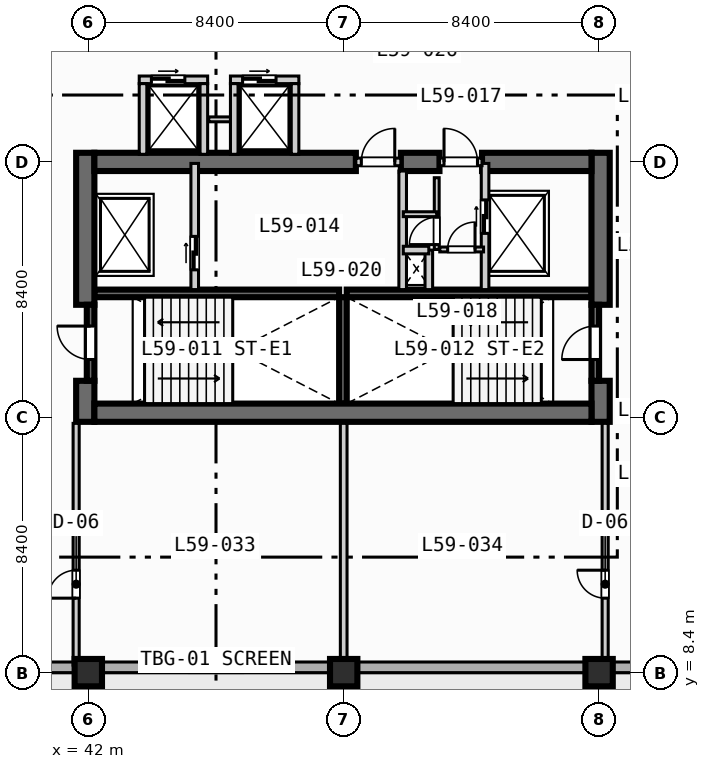
"""IFC4 building model, lengths in metres.
Left out: names, types, materials, properties, quantities, classifications, styles, units other than length and angle.
Written with IfcOpenShell. Run it as: python <this file> out.ifc"""

import sys

from ifc_helpers import new_model, si_unit, direction, frame, frame_2d, origin, origin_2d, place, context, subcontext, project, spatial, rectangle, extrude, element, fill, save


model = new_model("IFC4")
c1 = context("Model", 3, precision=1e-05, world=origin(), true_north=direction((0.0, 1.0)))
c2 = subcontext(c1, "Body", "Model", "MODEL_VIEW")
j1 = project(units=[si_unit("LENGTHUNIT", "METRE"), si_unit("PLANEANGLEUNIT", "RADIAN")], contexts=[c1])
p1 = place(None, origin())
s1 = spatial("IfcSite", under=j1, at=p1, CompositionType="ELEMENT")
p2 = place(p1, origin())
s2 = spatial("IfcBuilding", under=s1, at=p2, CompositionType="ELEMENT")
p3 = place(p2, frame((0.0, 0.0, 241.6)))
s3 = spatial("IfcBuildingStorey", under=s2, at=p3, CompositionType="ELEMENT", Elevation=241.6)
for number, where, z_axis, x_axis in (
    (1, (42.2, 20.875, 0.0), (0.0, 0.0, 1.0), (1.0, 0.0, 0.0)),
    (2, (50.5, 20.875, 0.0), (0.0, 0.0, 1.0), (1.0, 0.0, 0.0)),
):
    element("IfcWall", number, at=place(p3, frame(where, z_axis=z_axis, x_axis=x_axis)), inside=s3, PredefinedType="SOLIDWALL", context=c2, shape_type="SweptSolid", body=[
        extrude(rectangle(XDim=8.05, YDim=0.25, at=frame_2d((4.025, 0.0))), origin(), (0.0, 0.0, 1.0), 3.47),
    ])
p4 = place(p3, frame((50.375, 17.25, 0.0), z_axis=(0.0, 0.0, 1.0), x_axis=(0.0, 1.0, 0.0)))
e3 = element("IfcWall", 3, at=p4, inside=s3, PredefinedType="SOLIDWALL", context=c2, shape_type="SweptSolid", body=[
    extrude(rectangle(XDim=3.5, YDim=0.25, at=frame_2d((1.75, 0.0))), origin(), (0.0, 0.0, 1.0), 3.47),
])
p5 = place(p3, frame((41.9, 16.65, 0.0), z_axis=(0.0, 0.0, 1.0), x_axis=(0.0, 1.0, 0.0)))
e4 = element("IfcWall", 4, at=p5, inside=s3, PredefinedType="SHEAR", context=c2, shape_type="SweptSolid", body=[
    extrude(rectangle(XDim=1.35, YDim=0.6, at=frame_2d((0.675, 0.0))), origin(), (0.0, 0.0, 1.0), 3.47),
])
p6 = place(p3, frame((41.9, 20.5, 0.0), z_axis=(0.0, 0.0, 1.0), x_axis=(0.0, 1.0, 0.0)))
e5 = element("IfcWall", 5, at=p6, inside=s3, PredefinedType="SHEAR", context=c2, shape_type="SweptSolid", body=[
    extrude(rectangle(XDim=5.0, YDim=0.6, at=frame_2d((2.5, 0.0))), origin(), (0.0, 0.0, 1.0), 3.47),
])
p7 = place(p3, frame((58.85, 16.65, 0.0), z_axis=(0.0, 0.0, 1.0), x_axis=(0.0, 1.0, 0.0)))
e6 = element("IfcWall", 6, at=p7, inside=s3, PredefinedType="SHEAR", context=c2, shape_type="SweptSolid", body=[
    extrude(rectangle(XDim=1.35, YDim=0.6, at=frame_2d((0.675, 0.0))), origin(), (0.0, 0.0, 1.0), 3.47),
])
p8 = place(p3, frame((58.85, 20.5, 0.0), z_axis=(0.0, 0.0, 1.0), x_axis=(0.0, 1.0, 0.0)))
e7 = element("IfcWall", 7, at=p8, inside=s3, PredefinedType="SHEAR", context=c2, shape_type="SweptSolid", body=[
    extrude(rectangle(XDim=5.0, YDim=0.6, at=frame_2d((2.5, 0.0))), origin(), (0.0, 0.0, 1.0), 3.47),
])
p9 = place(p3, frame((42.2, 16.95, 0.0), z_axis=(0.0, 0.0, 1.0), x_axis=(1.0, 0.0, 0.0)))
e8 = element("IfcWall", 8, at=p9, inside=s3, PredefinedType="SHEAR", context=c2, shape_type="SweptSolid", body=[
    extrude(rectangle(XDim=16.35, YDim=0.6, at=frame_2d((8.175, 0.0))), origin(), (0.0, 0.0, 1.0), 3.47),
])
p10 = place(p3, frame((42.2, 25.2, 0.0), z_axis=(0.0, 0.0, 1.0), x_axis=(1.0, 0.0, 0.0)))
e9 = element("IfcWall", 9, at=p10, inside=s3, PredefinedType="SHEAR", context=c2, shape_type="SweptSolid", body=[
    extrude(rectangle(XDim=8.6, YDim=0.6, at=frame_2d((4.3, 0.0))), origin(), (0.0, 0.0, 1.0), 3.47),
])
p11 = place(p3, frame((52.28, 25.2, 0.0), z_axis=(0.0, 0.0, 1.0), x_axis=(1.0, 0.0, 0.0)))
e10 = element("IfcWall", 10, at=p11, inside=s3, PredefinedType="SHEAR", context=c2, shape_type="SweptSolid", body=[
    extrude(rectangle(XDim=1.27, YDim=0.6, at=frame_2d((0.635, 0.0))), origin(), (0.0, 0.0, 1.0), 3.47),
])
p12 = place(p3, frame((54.95, 25.2, 0.0), z_axis=(0.0, 0.0, 1.0), x_axis=(1.0, 0.0, 0.0)))
e11 = element("IfcWall", 11, at=p12, inside=s3, PredefinedType="SHEAR", context=c2, shape_type="SweptSolid", body=[
    extrude(rectangle(XDim=3.6, YDim=0.6, at=frame_2d((1.8, 0.0))), origin(), (0.0, 0.0, 1.0), 3.47),
])
for number, where, z_axis, x_axis in (
    (12, (42.0, 8.4, 0.0), (0.0, 0.0, 1.0), (1.0, 0.0, 0.0)),
    (13, (50.4, 8.4, 0.0), (0.0, 0.0, 1.0), (1.0, 0.0, 0.0)),
    (14, (58.8, 8.4, 0.0), (0.0, 0.0, 1.0), (1.0, 0.0, 0.0)),
):
    element("IfcColumn", number, at=place(p3, frame(where, z_axis=z_axis, x_axis=x_axis)), inside=s3, PredefinedType="COLUMN", context=c2, shape_type="SweptSolid", body=[
        extrude(rectangle(XDim=0.9, YDim=0.9, at=origin_2d()), origin(), (0.0, 0.0, 1.0), 3.7),
    ])
p13 = place(p3, frame((72.425, 8.575, 0.0), z_axis=(0.0, 0.0, 1.0), x_axis=(-1.0, 0.0, 0.0)))
e15 = element("IfcWall", 15, at=p13, inside=s3, PredefinedType="STANDARD", context=c2, shape_type="SweptSolid", body=[
    extrude(rectangle(XDim=60.85, YDim=0.35, at=frame_2d((30.425, 0.0))), origin(), (0.0, 0.0, 1.0), 3.47),
])
p14 = place(p13, frame((43.325, 0.0, 0.0)))
e16 = element("IfcOpeningElement", 16, at=p14, cuts=e15, PredefinedType="OPENING", context=c2, shape_type="SweptSolid", body=[
    extrude(rectangle(XDim=1.4, YDim=2.2, at=frame_2d((0.7, 1.1))), frame((0.0, 0.185, 0.0), z_axis=(0.0, -1.0, 0.0), x_axis=(1.0, 0.0, 0.0)), (0.0, 0.0, 1.0), 0.37),
])
p15 = place(p13, frame((33.425, 0.0, 0.85)))
e17 = element("IfcOpeningElement", 17, at=p15, cuts=e15, PredefinedType="OPENING", context=c2, shape_type="SweptSolid", body=[
    extrude(rectangle(XDim=2.4, YDim=1.95, at=frame_2d((1.2, 0.975))), frame((0.0, 0.185, 0.0), z_axis=(0.0, -1.0, 0.0), x_axis=(1.0, 0.0, 0.0)), (0.0, 0.0, 1.0), 0.37),
])
p16 = place(p13, frame((25.325, 0.0, 0.85)))
e18 = element("IfcOpeningElement", 18, at=p16, cuts=e15, PredefinedType="OPENING", context=c2, shape_type="SweptSolid", body=[
    extrude(rectangle(XDim=1.8, YDim=1.8, at=frame_2d((0.9, 0.9))), frame((0.0, 0.185, 0.0), z_axis=(0.0, -1.0, 0.0), x_axis=(1.0, 0.0, 0.0)), (0.0, 0.0, 1.0), 0.37),
])
p17 = place(p13, frame((56.325, 0.0, 0.85)))
e19 = element("IfcOpeningElement", 19, at=p17, cuts=e15, PredefinedType="OPENING", context=c2, shape_type="SweptSolid", body=[
    extrude(rectangle(XDim=1.8, YDim=1.8, at=frame_2d((0.9, 0.9))), frame((0.0, 0.185, 0.0), z_axis=(0.0, -1.0, 0.0), x_axis=(1.0, 0.0, 0.0)), (0.0, 0.0, 1.0), 0.37),
])
p18 = place(p3, frame((42.075, 18.0, 0.0), z_axis=(0.0, 0.0, 1.0), x_axis=(0.0, 1.0, 0.0)))
e20 = element("IfcWall", 20, at=p18, inside=s3, PredefinedType="SOLIDWALL", context=c2, shape_type="SweptSolid", body=[
    extrude(rectangle(XDim=2.5, YDim=0.25, at=frame_2d((1.25, 0.0))), origin(), (0.0, 0.0, 1.0), 3.47),
])
p19 = place(p18, frame((0.7, 0.0, 0.0)))
e21 = element("IfcOpeningElement", 21, at=p19, cuts=e20, PredefinedType="OPENING", context=c2, shape_type="SweptSolid", body=[
    extrude(rectangle(XDim=1.1, YDim=2.15, at=frame_2d((0.55, 1.075))), frame((0.0, 0.135, 0.0), z_axis=(0.0, -1.0, 0.0), x_axis=(1.0, 0.0, 0.0)), (0.0, 0.0, 1.0), 0.27),
])
p20 = place(p3, frame((58.675, 18.0, 0.0), z_axis=(0.0, 0.0, 1.0), x_axis=(0.0, 1.0, 0.0)))
e22 = element("IfcWall", 22, at=p20, inside=s3, PredefinedType="SOLIDWALL", context=c2, shape_type="SweptSolid", body=[
    extrude(rectangle(XDim=2.5, YDim=0.25, at=frame_2d((1.25, 0.0))), origin(), (0.0, 0.0, 1.0), 3.47),
])
p21 = place(p20, frame((0.7, 0.0, 0.0)))
e23 = element("IfcOpeningElement", 23, at=p21, cuts=e22, PredefinedType="OPENING", context=c2, shape_type="SweptSolid", body=[
    extrude(rectangle(XDim=1.1, YDim=2.15, at=frame_2d((0.55, 1.075))), frame((0.0, 0.135, 0.0), z_axis=(0.0, -1.0, 0.0), x_axis=(1.0, 0.0, 0.0)), (0.0, 0.0, 1.0), 0.27),
])
p22 = place(p3, frame((45.5, 21.0, 0.0), z_axis=(0.0, 0.0, 1.0), x_axis=(0.0, 1.0, 0.0)))
e24 = element("IfcWall", 24, at=p22, inside=s3, PredefinedType="SOLIDWALL", context=c2, shape_type="SweptSolid", body=[
    extrude(rectangle(XDim=4.15, YDim=0.25, at=frame_2d((2.075, 0.0))), origin(), (0.0, 0.0, 1.0), 3.47),
])
p23 = place(p22, frame((0.65, 0.0, 0.0)))
e25 = element("IfcOpeningElement", 25, at=p23, cuts=e24, PredefinedType="OPENING", context=c2, shape_type="SweptSolid", body=[
    extrude(rectangle(XDim=1.1, YDim=2.15, at=frame_2d((0.55, 1.075))), frame((0.0, 0.135, 0.0), z_axis=(0.0, -1.0, 0.0), x_axis=(1.0, 0.0, 0.0)), (0.0, 0.0, 1.0), 0.27),
])
p24 = place(p3, frame((50.8, 25.2, 0.0), z_axis=(0.0, 0.0, 1.0), x_axis=(1.0, 0.0, 0.0)))
e26 = element("IfcWall", 26, at=p24, inside=s3, PredefinedType="SOLIDWALL", context=c2, shape_type="SweptSolid", body=[
    extrude(rectangle(XDim=1.48, YDim=0.25, at=frame_2d((0.74, 0.0))), origin(), (0.0, 0.0, 1.0), 3.47),
])
p25 = place(p24, frame((0.18, 0.0, 0.0)))
e27 = element("IfcOpeningElement", 27, at=p25, cuts=e26, PredefinedType="OPENING", context=c2, shape_type="SweptSolid", body=[
    extrude(rectangle(XDim=1.1, YDim=2.15, at=frame_2d((0.55, 1.075))), frame((0.0, 0.135, 0.0), z_axis=(0.0, -1.0, 0.0), x_axis=(1.0, 0.0, 0.0)), (0.0, 0.0, 1.0), 0.27),
])
p26 = place(p3, frame((52.34, 21.0, 0.0), z_axis=(0.0, 0.0, 1.0), x_axis=(0.0, 1.0, 0.0)))
e28 = element("IfcWall", 28, at=p26, inside=s3, PredefinedType="SOLIDWALL", context=c2, shape_type="SweptSolid", body=[
    extrude(rectangle(XDim=3.9, YDim=0.25, at=frame_2d((1.95, 0.0))), origin(), (0.0, 0.0, 1.0), 3.47),
])
p27 = place(p3, frame((55.05, 21.0, 0.0), z_axis=(0.0, 0.0, 1.0), x_axis=(0.0, 1.0, 0.0)))
e29 = element("IfcWall", 29, at=p27, inside=s3, PredefinedType="SOLIDWALL", context=c2, shape_type="SweptSolid", body=[
    extrude(rectangle(XDim=4.15, YDim=0.25, at=frame_2d((2.075, 0.0))), origin(), (0.0, 0.0, 1.0), 3.47),
])
p28 = place(p27, frame((1.85, 0.0, 0.0)))
e30 = element("IfcOpeningElement", 30, at=p28, cuts=e29, PredefinedType="OPENING", context=c2, shape_type="SweptSolid", body=[
    extrude(rectangle(XDim=1.1, YDim=2.15, at=frame_2d((0.55, 1.075))), frame((0.0, 0.135, 0.0), z_axis=(0.0, -1.0, 0.0), x_axis=(1.0, 0.0, 0.0)), (0.0, 0.0, 1.0), 0.27),
])
p29 = place(p3, frame((53.55, 25.2, 0.0), z_axis=(0.0, 0.0, 1.0), x_axis=(1.0, 0.0, 0.0)))
e31 = element("IfcWall", 31, at=p29, inside=s3, PredefinedType="SOLIDWALL", context=c2, shape_type="SweptSolid", body=[
    extrude(rectangle(XDim=1.4, YDim=0.25, at=frame_2d((0.7, 0.0))), origin(), (0.0, 0.0, 1.0), 3.47),
])
p30 = place(p29, frame((0.15, 0.0, 0.0)))
e32 = element("IfcOpeningElement", 32, at=p30, cuts=e31, PredefinedType="OPENING", context=c2, shape_type="SweptSolid", body=[
    extrude(rectangle(XDim=1.1, YDim=2.15, at=frame_2d((0.55, 1.075))), frame((0.0, 0.135, 0.0), z_axis=(0.0, -1.0, 0.0), x_axis=(1.0, 0.0, 0.0)), (0.0, 0.0, 1.0), 0.27),
])
p31 = place(p3, frame((53.2, 21.0, 0.0), z_axis=(0.0, 0.0, 1.0), x_axis=(0.0, 1.0, 0.0)))
e33 = element("IfcWall", 33, at=p31, inside=s3, PredefinedType="SOLIDWALL", context=c2, shape_type="SweptSolid", body=[
    extrude(rectangle(XDim=1.3, YDim=0.25, at=frame_2d((0.65, 0.0))), origin(), (0.0, 0.0, 1.0), 3.47),
])
p32 = place(p3, frame((52.36, 22.3, 0.0), z_axis=(0.0, 0.0, 1.0), x_axis=(1.0, 0.0, 0.0)))
e34 = element("IfcWall", 34, at=p32, inside=s3, PredefinedType="SOLIDWALL", context=c2, shape_type="SweptSolid", body=[
    extrude(rectangle(XDim=0.84, YDim=0.25, at=frame_2d((0.42, 0.0))), origin(), (0.0, 0.0, 1.0), 3.47),
])
p33 = place(p3, frame((53.56, 22.32, 0.0), z_axis=(0.0, 0.0, 1.0), x_axis=(1.0, 0.0, 0.0)))
e35 = element("IfcWall", 35, at=p33, inside=s3, PredefinedType="PARTITIONING", context=c2, shape_type="SweptSolid", body=[
    extrude(rectangle(XDim=1.44, YDim=0.16, at=frame_2d((0.72, 0.0))), origin(), (0.0, 0.0, 1.0), 3.47),
])
p34 = place(p33, frame((0.26, 0.0, 0.0)))
e36 = element("IfcOpeningElement", 36, at=p34, cuts=e35, PredefinedType="OPENING", context=c2, shape_type="SweptSolid", body=[
    extrude(rectangle(XDim=0.9, YDim=2.1, at=frame_2d((0.45, 1.05))), frame((0.0, 0.09, 0.0), z_axis=(0.0, -1.0, 0.0), x_axis=(1.0, 0.0, 0.0)), (0.0, 0.0, 1.0), 0.18),
])
p35 = place(p3, frame((53.46, 22.32, 0.0), z_axis=(0.0, 0.0, 1.0), x_axis=(0.0, 1.0, 0.0)))
e37 = element("IfcWall", 37, at=p35, inside=s3, PredefinedType="PARTITIONING", context=c2, shape_type="SweptSolid", body=[
    extrude(rectangle(XDim=2.36, YDim=0.16, at=frame_2d((1.18, 0.0))), origin(), (0.0, 0.0, 1.0), 3.47),
])
p36 = place(p35, frame((0.16, 0.0, 0.0)))
e38 = element("IfcOpeningElement", 38, at=p36, cuts=e37, PredefinedType="OPENING", context=c2, shape_type="SweptSolid", body=[
    extrude(rectangle(XDim=0.9, YDim=2.1, at=frame_2d((0.45, 1.05))), frame((0.0, 0.09, 0.0), z_axis=(0.0, -1.0, 0.0), x_axis=(1.0, 0.0, 0.0)), (0.0, 0.0, 1.0), 0.18),
])
p37 = place(p3, frame((52.36, 23.48, 0.0), z_axis=(0.0, 0.0, 1.0), x_axis=(1.0, 0.0, 0.0)))
e39 = element("IfcWall", 39, at=p37, inside=s3, PredefinedType="PARTITIONING", context=c2, shape_type="SweptSolid", body=[
    extrude(rectangle(XDim=1.1, YDim=0.16, at=frame_2d((0.55, 0.0))), origin(), (0.0, 0.0, 1.0), 3.47),
])
p38 = place(p3, frame((43.675, 27.9, 0.0), z_axis=(0.0, 0.0, 1.0), x_axis=(1.0, 0.0, 0.0)))
e40 = element("IfcWall", 40, at=p38, inside=s3, PredefinedType="SOLIDWALL", context=c2, shape_type="SweptSolid", body=[
    extrude(rectangle(XDim=2.25, YDim=0.25, at=frame_2d((1.125, 0.0))), origin(), (0.0, 0.0, 1.0), 3.47),
])
p39 = place(p38, frame((0.4, 0.0, 0.0)))
e41 = element("IfcOpeningElement", 41, at=p39, cuts=e40, PredefinedType="OPENING", context=c2, shape_type="SweptSolid", body=[
    extrude(rectangle(XDim=1.1, YDim=2.15, at=frame_2d((0.55, 1.075))), frame((0.0, 0.135, 0.0), z_axis=(0.0, -1.0, 0.0), x_axis=(1.0, 0.0, 0.0)), (0.0, 0.0, 1.0), 0.27),
])
for number, where, z_axis, x_axis in (
    (42, (43.8, 25.45, 0.0), (0.0, 0.0, 1.0), (0.0, 1.0, 0.0)),
    (43, (45.8, 25.45, 0.0), (0.0, 0.0, 1.0), (0.0, 1.0, 0.0)),
):
    element("IfcWall", number, at=place(p3, frame(where, z_axis=z_axis, x_axis=x_axis)), inside=s3, PredefinedType="SOLIDWALL", context=c2, shape_type="SweptSolid", body=[
        extrude(rectangle(XDim=2.325, YDim=0.25, at=frame_2d((1.163, 0.0))), origin(), (0.0, 0.0, 1.0), 3.47),
    ])
p40 = place(p3, frame((45.96, 26.6, 0.0), z_axis=(0.0, 0.0, 1.0), x_axis=(1.0, 0.0, 0.0)))
e44 = element("IfcWall", 44, at=p40, inside=s3, PredefinedType="PARTITIONING", context=c2, shape_type="SweptSolid", body=[
    extrude(rectangle(XDim=0.88, YDim=0.16, at=frame_2d((0.44, 0.0))), origin(), (0.0, 0.0, 1.0), 3.47),
])
p41 = place(p3, frame((46.675, 27.9, 0.0), z_axis=(0.0, 0.0, 1.0), x_axis=(1.0, 0.0, 0.0)))
e45 = element("IfcWall", 45, at=p41, inside=s3, PredefinedType="SOLIDWALL", context=c2, shape_type="SweptSolid", body=[
    extrude(rectangle(XDim=2.25, YDim=0.25, at=frame_2d((1.125, 0.0))), origin(), (0.0, 0.0, 1.0), 3.47),
])
p42 = place(p41, frame((0.4, 0.0, 0.0)))
e46 = element("IfcOpeningElement", 46, at=p42, cuts=e45, PredefinedType="OPENING", context=c2, shape_type="SweptSolid", body=[
    extrude(rectangle(XDim=1.1, YDim=2.15, at=frame_2d((0.55, 1.075))), frame((0.0, 0.135, 0.0), z_axis=(0.0, -1.0, 0.0), x_axis=(1.0, 0.0, 0.0)), (0.0, 0.0, 1.0), 0.27),
])
for number, where, z_axis, x_axis in (
    (47, (46.8, 25.45, 0.0), (0.0, 0.0, 1.0), (0.0, 1.0, 0.0)),
    (48, (48.8, 25.45, 0.0), (0.0, 0.0, 1.0), (0.0, 1.0, 0.0)),
):
    element("IfcWall", number, at=place(p3, frame(where, z_axis=z_axis, x_axis=x_axis)), inside=s3, PredefinedType="SOLIDWALL", context=c2, shape_type="SweptSolid", body=[
        extrude(rectangle(XDim=2.325, YDim=0.25, at=frame_2d((1.163, 0.0))), origin(), (0.0, 0.0, 1.0), 3.47),
    ])
p43 = place(p3, frame((41.6, 8.65, 0.0), z_axis=(0.0, 0.0, 1.0), x_axis=(0.0, 1.0, 0.0)))
e49 = element("IfcWall", 49, at=p43, inside=s3, PredefinedType="PARTITIONING", context=c2, shape_type="SweptSolid", body=[
    extrude(rectangle(XDim=7.95, YDim=0.2, at=frame_2d((3.975, 0.0))), origin(), (0.0, 0.0, 1.0), 3.47),
])
p44 = place(p43, frame((2.2, 0.0, 0.0)))
e50 = element("IfcOpeningElement", 50, at=p44, cuts=e49, PredefinedType="OPENING", context=c2, shape_type="SweptSolid", body=[
    extrude(rectangle(XDim=0.92, YDim=2.1, at=frame_2d((0.46, 1.05))), frame((0.0, 0.11, 0.0), z_axis=(0.0, -1.0, 0.0), x_axis=(1.0, 0.0, 0.0)), (0.0, 0.0, 1.0), 0.22),
])
p45 = place(p3, frame((59.0, 8.65, 0.0), z_axis=(0.0, 0.0, 1.0), x_axis=(0.0, 1.0, 0.0)))
e51 = element("IfcWall", 51, at=p45, inside=s3, PredefinedType="PARTITIONING", context=c2, shape_type="SweptSolid", body=[
    extrude(rectangle(XDim=7.95, YDim=0.2, at=frame_2d((3.975, 0.0))), origin(), (0.0, 0.0, 1.0), 2.82),
])
p46 = place(p45, frame((2.2, 0.0, 0.0)))
e52 = element("IfcOpeningElement", 52, at=p46, cuts=e51, PredefinedType="OPENING", context=c2, shape_type="SweptSolid", body=[
    extrude(rectangle(XDim=0.92, YDim=2.1, at=frame_2d((0.46, 1.05))), frame((0.0, 0.11, 0.0), z_axis=(0.0, -1.0, 0.0), x_axis=(1.0, 0.0, 0.0)), (0.0, 0.0, 1.0), 0.22),
])
p47 = place(p3, frame((50.4, 8.65, 0.0), z_axis=(0.0, 0.0, 1.0), x_axis=(0.0, 1.0, 0.0)))
e53 = element("IfcWall", 53, at=p47, inside=s3, PredefinedType="PARTITIONING", context=c2, shape_type="SweptSolid", body=[
    extrude(rectangle(XDim=7.95, YDim=0.22, at=frame_2d((3.975, 0.0))), origin(), (0.0, 0.0, 1.0), 2.853),
])
p48 = place(p16, origin())
e54 = element("IfcWindow", 54, at=p48, inside=s3, PartitioningType="SINGLE_PANEL", PredefinedType="WINDOW", context=c2, shape_type="SweptSolid", body=[
    extrude(rectangle(XDim=1.8, YDim=1.8, at=frame_2d((0.9, 0.9))), frame((0.0, 0.03, 0.0), z_axis=(0.0, -1.0, 0.0), x_axis=(1.0, 0.0, 0.0)), (0.0, 0.0, 1.0), 0.06),
])
fill(e18, e54)
p49 = place(p19, origin())
e55 = element("IfcDoor", 55, at=p49, inside=s3, OperationType="SINGLE_SWING_RIGHT", PredefinedType="DOOR", context=c2, shape_type="SweptSolid", body=[
    extrude(rectangle(XDim=1.1, YDim=2.15, at=frame_2d((0.55, 1.075))), frame((0.0, 0.025, 0.0), z_axis=(0.0, -1.0, 0.0), x_axis=(1.0, 0.0, 0.0)), (0.0, 0.0, 1.0), 0.05),
])
fill(e21, e55)
p50 = place(p21, origin())
e56 = element("IfcDoor", 56, at=p50, inside=s3, OperationType="SINGLE_SWING_LEFT", PredefinedType="DOOR", context=c2, shape_type="SweptSolid", body=[
    extrude(rectangle(XDim=1.1, YDim=2.15, at=frame_2d((0.55, 1.075))), frame((0.0, 0.025, 0.0), z_axis=(0.0, -1.0, 0.0), x_axis=(1.0, 0.0, 0.0)), (0.0, 0.0, 1.0), 0.05),
])
fill(e23, e56)
p51 = place(p23, origin())
e57 = element("IfcDoor", 57, at=p51, inside=s3, OperationType="SLIDING_TO_LEFT", PredefinedType="DOOR", context=c2, shape_type="SweptSolid", body=[
    extrude(rectangle(XDim=1.1, YDim=2.15, at=frame_2d((0.55, 1.075))), frame((0.0, 0.025, 0.0), z_axis=(0.0, -1.0, 0.0), x_axis=(1.0, 0.0, 0.0)), (0.0, 0.0, 1.0), 0.05),
])
fill(e25, e57)
p52 = place(p25, origin())
e58 = element("IfcDoor", 58, at=p52, inside=s3, OperationType="SINGLE_SWING_RIGHT", PredefinedType="DOOR", context=c2, shape_type="SweptSolid", body=[
    extrude(rectangle(XDim=1.1, YDim=2.15, at=frame_2d((0.55, 1.075))), frame((0.0, 0.025, 0.0), z_axis=(0.0, -1.0, 0.0), x_axis=(1.0, 0.0, 0.0)), (0.0, 0.0, 1.0), 0.05),
])
fill(e27, e58)
p53 = place(p28, origin())
e59 = element("IfcDoor", 59, at=p53, inside=s3, OperationType="SLIDING_TO_LEFT", PredefinedType="DOOR", context=c2, shape_type="SweptSolid", body=[
    extrude(rectangle(XDim=1.1, YDim=2.15, at=frame_2d((0.55, 1.075))), frame((0.0, 0.025, 0.0), z_axis=(0.0, -1.0, 0.0), x_axis=(1.0, 0.0, 0.0)), (0.0, 0.0, 1.0), 0.05),
])
fill(e30, e59)
p54 = place(p30, origin())
e60 = element("IfcDoor", 60, at=p54, inside=s3, OperationType="SINGLE_SWING_LEFT", PredefinedType="DOOR", context=c2, shape_type="SweptSolid", body=[
    extrude(rectangle(XDim=1.1, YDim=2.15, at=frame_2d((0.55, 1.075))), frame((0.0, 0.025, 0.0), z_axis=(0.0, -1.0, 0.0), x_axis=(1.0, 0.0, 0.0)), (0.0, 0.0, 1.0), 0.05),
])
fill(e32, e60)
p55 = place(p34, origin())
e61 = element("IfcDoor", 61, at=p55, inside=s3, OperationType="SINGLE_SWING_RIGHT", PredefinedType="DOOR", context=c2, shape_type="SweptSolid", body=[
    extrude(rectangle(XDim=0.9, YDim=2.1, at=frame_2d((0.45, 1.05))), frame((0.0, 0.025, 0.0), z_axis=(0.0, -1.0, 0.0), x_axis=(1.0, 0.0, 0.0)), (0.0, 0.0, 1.0), 0.05),
])
fill(e36, e61)
p56 = place(p36, origin())
e62 = element("IfcDoor", 62, at=p56, inside=s3, OperationType="SINGLE_SWING_LEFT", PredefinedType="DOOR", context=c2, shape_type="SweptSolid", body=[
    extrude(rectangle(XDim=0.9, YDim=2.1, at=frame_2d((0.45, 1.05))), frame((0.0, 0.025, 0.0), z_axis=(0.0, -1.0, 0.0), x_axis=(1.0, 0.0, 0.0)), (0.0, 0.0, 1.0), 0.05),
])
fill(e38, e62)
p57 = place(p39, origin())
e63 = element("IfcDoor", 63, at=p57, inside=s3, OperationType="SLIDING_TO_LEFT", PredefinedType="DOOR", context=c2, shape_type="SweptSolid", body=[
    extrude(rectangle(XDim=1.1, YDim=2.15, at=frame_2d((0.55, 1.075))), frame((0.0, 0.025, 0.0), z_axis=(0.0, -1.0, 0.0), x_axis=(1.0, 0.0, 0.0)), (0.0, 0.0, 1.0), 0.05),
])
fill(e41, e63)
p58 = place(p42, origin())
e64 = element("IfcDoor", 64, at=p58, inside=s3, OperationType="SLIDING_TO_LEFT", PredefinedType="DOOR", context=c2, shape_type="SweptSolid", body=[
    extrude(rectangle(XDim=1.1, YDim=2.15, at=frame_2d((0.55, 1.075))), frame((0.0, 0.025, 0.0), z_axis=(0.0, -1.0, 0.0), x_axis=(1.0, 0.0, 0.0)), (0.0, 0.0, 1.0), 0.05),
])
fill(e46, e64)
p59 = place(p44, origin())
e65 = element("IfcDoor", 65, at=p59, inside=s3, OperationType="SINGLE_SWING_LEFT", PredefinedType="DOOR", context=c2, shape_type="SweptSolid", body=[
    extrude(rectangle(XDim=0.92, YDim=2.1, at=frame_2d((0.46, 1.05))), frame((0.0, 0.025, 0.0), z_axis=(0.0, -1.0, 0.0), x_axis=(1.0, 0.0, 0.0)), (0.0, 0.0, 1.0), 0.05),
])
fill(e50, e65)
p60 = place(p46, origin())
e66 = element("IfcDoor", 66, at=p60, inside=s3, OperationType="SINGLE_SWING_RIGHT", PredefinedType="DOOR", context=c2, shape_type="SweptSolid", body=[
    extrude(rectangle(XDim=0.92, YDim=2.1, at=frame_2d((0.46, 1.05))), frame((0.0, 0.025, 0.0), z_axis=(0.0, -1.0, 0.0), x_axis=(1.0, 0.0, 0.0)), (0.0, 0.0, 1.0), 0.05),
])
fill(e52, e66)
save(model, sys.argv[1])
